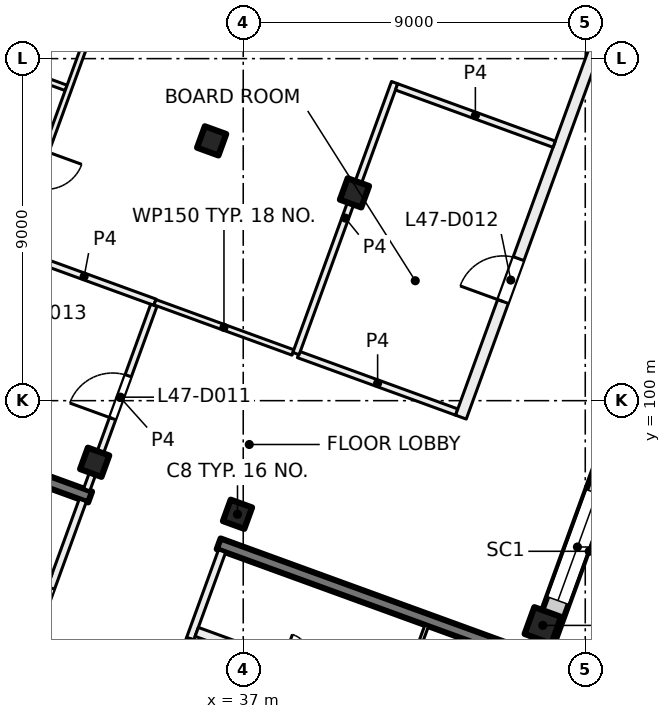
"""IFC4 building model, lengths in metres.
Left out: names, types, materials, properties, quantities, classifications, styles, units other than length and angle.
Written with IfcOpenShell. Run it as: python <this file> out.ifc"""

import sys

from ifc_helpers import new_model, si_unit, direction, frame, frame_2d, origin, origin_2d, place, context, subcontext, project, spatial, rectangle, extrude, element, fill, save


model = new_model("IFC4")
c1 = context("Model", 3, precision=1e-05, world=origin(), true_north=direction((0.0, 1.0)))
c2 = subcontext(c1, "Body", "Model", "MODEL_VIEW")
j1 = project(units=[si_unit("LENGTHUNIT", "METRE"), si_unit("PLANEANGLEUNIT", "RADIAN")], contexts=[c1])
p1 = place(None, origin())
s1 = spatial("IfcSite", under=j1, at=p1, CompositionType="ELEMENT")
p2 = place(p1, origin())
s2 = spatial("IfcBuilding", under=s1, at=p2, CompositionType="ELEMENT")
p3 = place(p2, frame((0.0, 0.0, 200.0)))
s3 = spatial("IfcBuildingStorey", under=s2, at=p3, CompositionType="ELEMENT", Elevation=200.0)
for number, where, z_axis, x_axis in (
    (1, (39.927, 105.468, 0.0), (0.0, 0.0, 1.0), (-0.342, -0.94, 0.0)),
    (2, (36.849, 97.011, 0.0), (0.0, 0.0, 1.0), (-0.342, -0.94, 0.0)),
    (3, (36.169, 106.836, 0.0), (0.0, 0.0, 1.0), (-0.342, -0.94, 0.0)),
    (4, (33.091, 98.379, 0.0), (0.0, 0.0, 1.0), (-0.342, -0.94, 0.0)),
):
    element("IfcColumn", number, at=place(p3, frame(where, z_axis=z_axis, x_axis=x_axis)), inside=s3, PredefinedType="COLUMN", context=c2, shape_type="SweptSolid", body=[
        extrude(rectangle(XDim=0.6, YDim=0.6, at=origin_2d()), origin(), (0.0, 0.0, 1.0), 4.0),
    ])
p4 = place(p3, frame((44.884, 94.087, 0.0), z_axis=(0.0, 0.0, 1.0), x_axis=(-0.342020143326, -0.939692620786, 0.0)))
e5 = element("IfcColumn", 5, at=p4, inside=s3, PredefinedType="COLUMN", context=c2, shape_type="SweptSolid", body=[
    extrude(rectangle(XDim=0.75, YDim=0.75, at=origin_2d()), origin(), (0.0, 0.0, 1.0), 4.0),
])
p5 = place(p3, frame((41.874, 85.232, 0.0), z_axis=(0.0, 0.0, 1.0), x_axis=(0.342020437038, 0.939692513883, 0.0)))
e6 = element("IfcWall", 6, at=p5, inside=s3, PredefinedType="SHEAR", context=c2, shape_type="SweptSolid", body=[
    extrude(rectangle(XDim=8.975, YDim=0.5, at=frame_2d((4.487, 0.0))), origin(), (0.0, 0.0, 1.0), 4.0),
])
p6 = place(p3, frame((44.529, 93.258, 0.0), z_axis=(0.0, 0.0, 1.0), x_axis=(-0.9396917844, 0.342022441267, 0.0)))
e7 = element("IfcWall", 7, at=p6, inside=s3, PredefinedType="SHEAR", context=c2, shape_type="SweptSolid", body=[
    extrude(rectangle(XDim=8.7, YDim=0.3, at=frame_2d((4.35, 0.0))), origin(), (0.0, 0.0, 1.0), 4.0),
])
p7 = place(p3, frame((32.971, 97.465, 0.0), z_axis=(0.0, 0.0, 1.0), x_axis=(-0.939695066972, 0.34201342241, 0.0)))
e8 = element("IfcWall", 8, at=p7, inside=s3, PredefinedType="SHEAR", context=c2, shape_type="SweptSolid", body=[
    extrude(rectangle(XDim=8.7, YDim=0.3, at=frame_2d((4.35, 0.0))), origin(), (0.0, 0.0, 1.0), 4.0),
])
p8 = place(p3, frame((52.212, 113.783, 0.0), z_axis=(0.0, 0.0, 1.0), x_axis=(-0.34202521188, -0.939690775968, 0.0)))
e9 = element("IfcWall", 9, at=p8, inside=s3, PredefinedType="SOLIDWALL", context=c2, shape_type="SweptSolid", body=[
    extrude(rectangle(XDim=21.745, YDim=0.6, at=frame_2d((10.873, 0.0))), origin(), (0.0, 0.0, 1.0), 3.625),
])
p9 = place(p8, frame((3.765, 0.0, 0.9)))
e10 = element("IfcOpeningElement", 10, at=p9, cuts=e9, PredefinedType="OPENING", context=c2, shape_type="SweptSolid", body=[
    extrude(rectangle(XDim=3.0, YDim=2.4, at=frame_2d((1.5, 1.2))), frame((0.0, 0.31, 0.0), z_axis=(0.0, -1.0, 0.0), x_axis=(1.0, 0.0, 0.0)), (0.0, 0.0, 1.0), 0.62),
])
p10 = place(p8, frame((8.265, 0.0, 0.9)))
e11 = element("IfcOpeningElement", 11, at=p10, cuts=e9, PredefinedType="OPENING", context=c2, shape_type="SweptSolid", body=[
    extrude(rectangle(XDim=3.0, YDim=2.4, at=frame_2d((1.5, 1.2))), frame((0.0, 0.31, 0.0), z_axis=(0.0, -1.0, 0.0), x_axis=(1.0, 0.0, 0.0)), (0.0, 0.0, 1.0), 0.62),
])
p11 = place(p8, frame((12.765, 0.0, 0.9)))
e12 = element("IfcOpeningElement", 12, at=p11, cuts=e9, PredefinedType="OPENING", context=c2, shape_type="SweptSolid", body=[
    extrude(rectangle(XDim=3.0, YDim=2.4, at=frame_2d((1.5, 1.2))), frame((0.0, 0.31, 0.0), z_axis=(0.0, -1.0, 0.0), x_axis=(1.0, 0.0, 0.0)), (0.0, 0.0, 1.0), 0.62),
])
p12 = place(p8, frame((17.265, 0.0, 0.9)))
e13 = element("IfcOpeningElement", 13, at=p12, cuts=e9, PredefinedType="OPENING", context=c2, shape_type="SweptSolid", body=[
    extrude(rectangle(XDim=3.0, YDim=2.4, at=frame_2d((1.5, 1.2))), frame((0.0, 0.31, 0.0), z_axis=(0.0, -1.0, 0.0), x_axis=(1.0, 0.0, 0.0)), (0.0, 0.0, 1.0), 0.62),
])
p13 = place(p3, frame((24.666, 100.669, 0.0), z_axis=(0.0, 0.0, 1.0), x_axis=(0.34201964167, 0.939692803373, 0.0)))
e14 = element("IfcWall", 14, at=p13, inside=s3, PredefinedType="SOLIDWALL", context=c2, shape_type="SweptSolid", body=[
    extrude(rectangle(XDim=32.884, YDim=0.6, at=frame_2d((16.442, 0.0))), origin(), (0.0, 0.0, 1.0), 3.625),
])
p14 = place(p13, frame((1.48, 0.0, 0.9)))
e15 = element("IfcOpeningElement", 15, at=p14, cuts=e14, PredefinedType="OPENING", context=c2, shape_type="SweptSolid", body=[
    extrude(rectangle(XDim=3.0, YDim=2.4, at=frame_2d((1.5, 1.2))), frame((0.0, 0.31, 0.0), z_axis=(0.0, -1.0, 0.0), x_axis=(1.0, 0.0, 0.0)), (0.0, 0.0, 1.0), 0.62),
])
p15 = place(p13, frame((5.98, 0.0, 0.9)))
e16 = element("IfcOpeningElement", 16, at=p15, cuts=e14, PredefinedType="OPENING", context=c2, shape_type="SweptSolid", body=[
    extrude(rectangle(XDim=3.0, YDim=2.4, at=frame_2d((1.5, 1.2))), frame((0.0, 0.31, 0.0), z_axis=(0.0, -1.0, 0.0), x_axis=(1.0, 0.0, 0.0)), (0.0, 0.0, 1.0), 0.62),
])
p16 = place(p13, frame((10.48, 0.0, 0.9)))
e17 = element("IfcOpeningElement", 17, at=p16, cuts=e14, PredefinedType="OPENING", context=c2, shape_type="SweptSolid", body=[
    extrude(rectangle(XDim=3.0, YDim=2.4, at=frame_2d((1.5, 1.2))), frame((0.0, 0.31, 0.0), z_axis=(0.0, -1.0, 0.0), x_axis=(1.0, 0.0, 0.0)), (0.0, 0.0, 1.0), 0.62),
])
p17 = place(p13, frame((14.98, 0.0, 0.9)))
e18 = element("IfcOpeningElement", 18, at=p17, cuts=e14, PredefinedType="OPENING", context=c2, shape_type="SweptSolid", body=[
    extrude(rectangle(XDim=3.0, YDim=2.4, at=frame_2d((1.5, 1.2))), frame((0.0, 0.31, 0.0), z_axis=(0.0, -1.0, 0.0), x_axis=(1.0, 0.0, 0.0)), (0.0, 0.0, 1.0), 0.62),
])
p18 = place(p13, frame((19.48, 0.0, 0.9)))
e19 = element("IfcOpeningElement", 19, at=p18, cuts=e14, PredefinedType="OPENING", context=c2, shape_type="SweptSolid", body=[
    extrude(rectangle(XDim=3.0, YDim=2.4, at=frame_2d((1.5, 1.2))), frame((0.0, 0.31, 0.0), z_axis=(0.0, -1.0, 0.0), x_axis=(1.0, 0.0, 0.0)), (0.0, 0.0, 1.0), 0.62),
])
p19 = place(p13, frame((23.98, 0.0, 0.9)))
e20 = element("IfcOpeningElement", 20, at=p19, cuts=e14, PredefinedType="OPENING", context=c2, shape_type="SweptSolid", body=[
    extrude(rectangle(XDim=3.0, YDim=2.4, at=frame_2d((1.5, 1.2))), frame((0.0, 0.31, 0.0), z_axis=(0.0, -1.0, 0.0), x_axis=(1.0, 0.0, 0.0)), (0.0, 0.0, 1.0), 0.62),
])
p20 = place(p13, frame((28.48, 0.0, 0.9)))
e21 = element("IfcOpeningElement", 21, at=p20, cuts=e14, PredefinedType="OPENING", context=c2, shape_type="SweptSolid", body=[
    extrude(rectangle(XDim=3.0, YDim=2.4, at=frame_2d((1.5, 1.2))), frame((0.0, 0.31, 0.0), z_axis=(0.0, -1.0, 0.0), x_axis=(1.0, 0.0, 0.0)), (0.0, 0.0, 1.0), 0.62),
])
p21 = place(p3, frame((31.427, 93.663, 0.0), z_axis=(0.0, 0.0, 1.0), x_axis=(0.342030870568, 0.93968871632, 0.0)))
e22 = element("IfcWall", 22, at=p21, inside=s3, PredefinedType="PARTITIONING", context=c2, shape_type="SweptSolid", body=[
    extrude(rectangle(XDim=3.95, YDim=0.2, at=frame_2d((1.975, 0.0))), origin(), (0.0, 0.0, 1.0), 3.625),
])
p22 = place(p21, frame((0.3, 0.0, 0.0)))
e23 = element("IfcOpeningElement", 23, at=p22, cuts=e22, PredefinedType="OPENING", context=c2, shape_type="SweptSolid", body=[
    extrude(rectangle(XDim=1.2, YDim=2.1, at=frame_2d((0.6, 1.05))), frame((0.0, 0.11, 0.0), z_axis=(0.0, -1.0, 0.0), x_axis=(1.0, 0.0, 0.0)), (0.0, 0.0, 1.0), 0.22),
])
p23 = place(p3, frame((23.983, 98.208, 0.0), z_axis=(0.0, 0.0, 1.0), x_axis=(0.939699751196, -0.342000552051, 0.0)))
e24 = element("IfcWall", 24, at=p23, inside=s3, PredefinedType="PARTITIONING", context=c2, shape_type="SweptSolid", body=[
    extrude(rectangle(XDim=8.45, YDim=0.25, at=frame_2d((4.225, 0.0))), origin(), (0.0, 0.0, 1.0), 3.625),
])
p24 = place(p23, frame((5.26, 0.0, 0.0)))
e25 = element("IfcOpeningElement", 25, at=p24, cuts=e24, PredefinedType="OPENING", context=c2, shape_type="SweptSolid", body=[
    extrude(rectangle(XDim=0.8, YDim=2.1, at=frame_2d((0.4, 1.05))), frame((0.0, 0.135, 0.0), z_axis=(0.0, -1.0, 0.0), x_axis=(1.0, 0.0, 0.0)), (0.0, 0.0, 1.0), 0.27),
])
p25 = place(p23, frame((0.985, 0.0, 0.0)))
e26 = element("IfcOpeningElement", 26, at=p25, cuts=e24, PredefinedType="OPENING", context=c2, shape_type="SweptSolid", body=[
    extrude(rectangle(XDim=0.8, YDim=2.1, at=frame_2d((0.4, 1.05))), frame((0.0, 0.135, 0.0), z_axis=(0.0, -1.0, 0.0), x_axis=(1.0, 0.0, 0.0)), (0.0, 0.0, 1.0), 0.27),
])
p26 = place(p3, frame((36.443, 96.041, 0.0), z_axis=(0.0, 0.0, 1.0), x_axis=(-0.341996156931, -0.939701350773, 0.0)))
e27 = element("IfcWall", 27, at=p26, inside=s3, PredefinedType="PARTITIONING", context=c2, shape_type="SweptSolid", body=[
    extrude(rectangle(XDim=3.95, YDim=0.2, at=frame_2d((1.975, 0.0))), origin(), (0.0, 0.0, 1.0), 3.625),
])
p27 = place(p26, frame((2.45, 0.0, 0.0)))
e28 = element("IfcOpeningElement", 28, at=p27, cuts=e27, PredefinedType="OPENING", context=c2, shape_type="SweptSolid", body=[
    extrude(rectangle(XDim=1.2, YDim=2.1, at=frame_2d((0.6, 1.05))), frame((0.0, 0.11, 0.0), z_axis=(0.0, -1.0, 0.0), x_axis=(1.0, 0.0, 0.0)), (0.0, 0.0, 1.0), 0.22),
])
p28 = place(p3, frame((35.776, 93.916, 0.0), z_axis=(0.0, 0.0, 1.0), x_axis=(0.939690465531, -0.342026064782, 0.0)))
e29 = element("IfcWall", 29, at=p28, inside=s3, PredefinedType="PARTITIONING", context=c2, shape_type="SweptSolid", body=[
    extrude(rectangle(XDim=8.45, YDim=0.25, at=frame_2d((4.225, 0.0))), origin(), (0.0, 0.0, 1.0), 3.625),
])
p29 = place(p28, frame((2.39, 0.0, 0.0)))
e30 = element("IfcOpeningElement", 30, at=p29, cuts=e29, PredefinedType="OPENING", context=c2, shape_type="SweptSolid", body=[
    extrude(rectangle(XDim=0.8, YDim=2.1, at=frame_2d((0.4, 1.05))), frame((0.0, 0.135, 0.0), z_axis=(0.0, -1.0, 0.0), x_axis=(1.0, 0.0, 0.0)), (0.0, 0.0, 1.0), 0.27),
])
p30 = place(p28, frame((6.665, 0.0, 0.0)))
e31 = element("IfcOpeningElement", 31, at=p30, cuts=e29, PredefinedType="OPENING", context=c2, shape_type="SweptSolid", body=[
    extrude(rectangle(XDim=0.8, YDim=2.1, at=frame_2d((0.4, 1.05))), frame((0.0, 0.135, 0.0), z_axis=(0.0, -1.0, 0.0), x_axis=(1.0, 0.0, 0.0)), (0.0, 0.0, 1.0), 0.27),
])
p31 = place(p3, frame((41.828, 94.082, 0.0), z_axis=(0.0, 0.0, 1.0), x_axis=(-0.342023078919, -0.939691552312, 0.0)))
e32 = element("IfcWall", 32, at=p31, inside=s3, PredefinedType="PARTITIONING", context=c2, shape_type="SweptSolid", body=[
    extrude(rectangle(XDim=2.1, YDim=0.1, at=frame_2d((1.05, 0.0))), origin(), (0.0, 0.0, 1.0), 3.625),
])
p32 = place(p3, frame((28.275, 109.709, 0.0), z_axis=(0.0, 0.0, 1.0), x_axis=(0.939737385516, -0.341897128188, 0.0)))
e33 = element("IfcWall", 33, at=p32, inside=s3, PredefinedType="PARTITIONING", context=c2, shape_type="SweptSolid", body=[
    extrude(rectangle(XDim=4.326, YDim=0.15, at=frame_2d((2.163, 0.0))), origin(), (0.0, 0.0, 1.0), 3.625),
])
p33 = place(p3, frame((30.95, 103.946, 0.0), z_axis=(0.0, 0.0, 1.0), x_axis=(0.939739492658, -0.341891336449, 0.0)))
e34 = element("IfcWall", 34, at=p33, inside=s3, PredefinedType="PARTITIONING", context=c2, shape_type="SweptSolid", body=[
    extrude(rectangle(XDim=3.966, YDim=0.175, at=frame_2d((1.983, 0.0))), origin(), (0.0, 0.0, 1.0), 3.625),
])
p34 = place(p3, frame((33.975, 112.503, 0.0), z_axis=(0.0, 0.0, 1.0), x_axis=(-0.342067078165, -0.939675536574, 0.0)))
e35 = element("IfcWall", 35, at=p34, inside=s3, PredefinedType="PARTITIONING", context=c2, shape_type="SweptSolid", body=[
    extrude(rectangle(XDim=9.074, YDim=0.15, at=frame_2d((4.537, 0.0))), origin(), (0.0, 0.0, 1.0), 3.625),
])
p35 = place(p34, frame((6.325, 0.0, 0.0)))
e36 = element("IfcOpeningElement", 36, at=p35, cuts=e35, PredefinedType="OPENING", context=c2, shape_type="SweptSolid", body=[
    extrude(rectangle(XDim=1.0, YDim=2.1, at=frame_2d((0.5, 1.05))), frame((0.0, 0.085, 0.0), z_axis=(0.0, -1.0, 0.0), x_axis=(1.0, 0.0, 0.0)), (0.0, 0.0, 1.0), 0.17),
])
p36 = place(p34, frame((1.825, 0.0, 0.0)))
e37 = element("IfcOpeningElement", 37, at=p36, cuts=e35, PredefinedType="OPENING", context=c2, shape_type="SweptSolid", body=[
    extrude(rectangle(XDim=1.0, YDim=2.1, at=frame_2d((0.5, 1.05))), frame((0.0, 0.085, 0.0), z_axis=(0.0, -1.0, 0.0), x_axis=(1.0, 0.0, 0.0)), (0.0, 0.0, 1.0), 0.17),
])
p37 = place(p3, frame((32.881, 97.657, 0.0), z_axis=(0.0, 0.0, 1.0), x_axis=(0.342058204353, 0.939678766832, 0.0)))
e38 = element("IfcWall", 38, at=p37, inside=s3, PredefinedType="PARTITIONING", context=c2, shape_type="SweptSolid", body=[
    extrude(rectangle(XDim=5.163, YDim=0.175, at=frame_2d((2.581, 0.0))), origin(), (0.0, 0.0, 1.0), 3.625),
])
p38 = place(p37, frame((1.991, 0.0, 0.0)))
e39 = element("IfcOpeningElement", 39, at=p38, cuts=e38, PredefinedType="OPENING", context=c2, shape_type="SweptSolid", body=[
    extrude(rectangle(XDim=1.2, YDim=2.1, at=frame_2d((0.6, 1.05))), frame((0.0, 0.097, 0.0), z_axis=(0.0, -1.0, 0.0), x_axis=(1.0, 0.0, 0.0)), (0.0, 0.0, 1.0), 0.195),
])
p39 = place(p3, frame((34.677, 102.59, 0.0), z_axis=(0.0, 0.0, 1.0), x_axis=(0.939688259666, -0.342032125166, 0.0)))
e40 = element("IfcWall", 40, at=p39, inside=s3, PredefinedType="PARTITIONING", context=c2, shape_type="SweptSolid", body=[
    extrude(rectangle(XDim=3.865, YDim=0.15, at=frame_2d((1.933, 0.0))), origin(), (0.0, 0.0, 1.0), 3.625),
])
p40 = place(p3, frame((38.455, 101.214, 0.0), z_axis=(0.0, 0.0, 1.0), x_axis=(0.939738687483, -0.341893549585, 0.0)))
e41 = element("IfcWall", 41, at=p40, inside=s3, PredefinedType="PARTITIONING", context=c2, shape_type="SweptSolid", body=[
    extrude(rectangle(XDim=4.429, YDim=0.175, at=frame_2d((2.214, 0.0))), origin(), (0.0, 0.0, 1.0), 3.625),
])
p41 = place(p3, frame((40.983, 108.369, 0.0), z_axis=(0.0, 0.0, 1.0), x_axis=(-0.342009155387, -0.939696619996, 0.0)))
e42 = element("IfcWall", 42, at=p41, inside=s3, PredefinedType="PARTITIONING", context=c2, shape_type="SweptSolid", body=[
    extrude(rectangle(XDim=7.587, YDim=0.175, at=frame_2d((3.794, 0.0))), origin(), (0.0, 0.0, 1.0), 3.625),
])
p42 = place(p3, frame((42.728, 99.567, 0.0), z_axis=(0.0, 0.0, 1.0), x_axis=(0.342015412648, 0.939694342598, 0.0)))
e43 = element("IfcWall", 43, at=p42, inside=s3, PredefinedType="PARTITIONING", context=c2, shape_type="SweptSolid", body=[
    extrude(rectangle(XDim=23.031, YDim=0.3, at=frame_2d((11.516, 0.0))), origin(), (0.0, 0.0, 1.0), 3.625),
])
p43 = place(p42, frame((3.237, 0.0, 0.0)))
e44 = element("IfcOpeningElement", 44, at=p43, cuts=e43, PredefinedType="OPENING", context=c2, shape_type="SweptSolid", body=[
    extrude(rectangle(XDim=1.2, YDim=2.1, at=frame_2d((0.6, 1.05))), frame((0.0, 0.16, 0.0), z_axis=(0.0, -1.0, 0.0), x_axis=(1.0, 0.0, 0.0)), (0.0, 0.0, 1.0), 0.32),
])
p44 = place(p42, frame((14.187, 0.0, 0.0)))
e45 = element("IfcOpeningElement", 45, at=p44, cuts=e43, PredefinedType="OPENING", context=c2, shape_type="SweptSolid", body=[
    extrude(rectangle(XDim=1.8, YDim=2.1, at=frame_2d((0.9, 1.05))), frame((0.0, 0.16, 0.0), z_axis=(0.0, -1.0, 0.0), x_axis=(1.0, 0.0, 0.0)), (0.0, 0.0, 1.0), 0.32),
])
p45 = place(p3, frame((45.182, 106.748, 0.0), z_axis=(0.0, 0.0, 1.0), x_axis=(-0.939717482524, 0.341951828534, 0.0)))
e46 = element("IfcWall", 46, at=p45, inside=s3, PredefinedType="PARTITIONING", context=c2, shape_type="SweptSolid", body=[
    extrude(rectangle(XDim=4.413, YDim=0.175, at=frame_2d((2.207, 0.0))), origin(), (0.0, 0.0, 1.0), 3.625),
])
p46 = place(p12, origin())
e47 = element("IfcWindow", 47, at=p46, inside=s3, PartitioningType="SINGLE_PANEL", PredefinedType="WINDOW", context=c2, shape_type="SweptSolid", body=[
    extrude(rectangle(XDim=3.0, YDim=2.4, at=frame_2d((1.5, 1.2))), frame((0.0, 0.03, 0.0), z_axis=(0.0, -1.0, 0.0), x_axis=(1.0, 0.0, 0.0)), (0.0, 0.0, 1.0), 0.06),
])
fill(e13, e47)
p47 = place(p22, origin())
e48 = element("IfcDoor", 48, at=p47, inside=s3, OperationType="DOUBLE_DOOR_SINGLE_SWING", PredefinedType="DOOR", context=c2, shape_type="SweptSolid", body=[
    extrude(rectangle(XDim=1.2, YDim=2.1, at=frame_2d((0.6, 1.05))), frame((0.0, 0.025, 0.0), z_axis=(0.0, -1.0, 0.0), x_axis=(1.0, 0.0, 0.0)), (0.0, 0.0, 1.0), 0.05),
])
fill(e23, e48)
p48 = place(p27, origin())
e49 = element("IfcDoor", 49, at=p48, inside=s3, OperationType="DOUBLE_DOOR_SINGLE_SWING", PredefinedType="DOOR", context=c2, shape_type="SweptSolid", body=[
    extrude(rectangle(XDim=1.2, YDim=2.1, at=frame_2d((0.6, 1.05))), frame((0.0, 0.025, 0.0), z_axis=(0.0, -1.0, 0.0), x_axis=(1.0, 0.0, 0.0)), (0.0, 0.0, 1.0), 0.05),
])
fill(e28, e49)
p49 = place(p38, origin())
e50 = element("IfcDoor", 50, at=p49, inside=s3, OperationType="DOUBLE_DOOR_SINGLE_SWING", PredefinedType="DOOR", context=c2, shape_type="SweptSolid", body=[
    extrude(rectangle(XDim=1.2, YDim=2.1, at=frame_2d((0.6, 1.05))), frame((0.0, 0.025, 0.0), z_axis=(0.0, -1.0, 0.0), x_axis=(1.0, 0.0, 0.0)), (0.0, 0.0, 1.0), 0.05),
])
fill(e39, e50)
p50 = place(p43, origin())
e51 = element("IfcDoor", 51, at=p50, inside=s3, OperationType="DOUBLE_DOOR_SINGLE_SWING", PredefinedType="DOOR", context=c2, shape_type="SweptSolid", body=[
    extrude(rectangle(XDim=1.2, YDim=2.1, at=frame_2d((0.6, 1.05))), frame((0.0, 0.025, 0.0), z_axis=(0.0, -1.0, 0.0), x_axis=(1.0, 0.0, 0.0)), (0.0, 0.0, 1.0), 0.05),
])
fill(e44, e51)
save(model, sys.argv[1])
